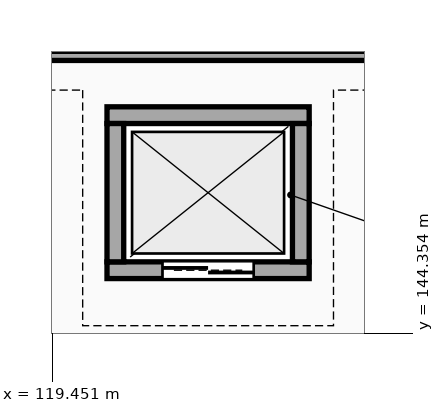
"""IFC4 building model, lengths in metres.
Left out: names, types, materials, properties, quantities, classifications, styles, units other than length and angle.
Written with IfcOpenShell. Run it as: python <this file> out.ifc"""

import sys

from ifc_helpers import new_model, si_unit, direction, frame, frame_2d, origin, place, context, subcontext, project, spatial, rectangle, extrude, element, fill, save


model = new_model("IFC4")
c1 = context("Model", 3, precision=1e-05, world=origin(), true_north=direction((0.0, 1.0)))
c2 = subcontext(c1, "Body", "Model", "MODEL_VIEW")
j1 = project(units=[si_unit("LENGTHUNIT", "METRE"), si_unit("PLANEANGLEUNIT", "RADIAN")], contexts=[c1])
p1 = place(None, origin())
s1 = spatial("IfcSite", under=j1, at=p1, CompositionType="ELEMENT")
p2 = place(p1, origin())
s2 = spatial("IfcBuilding", under=s1, at=p2, CompositionType="ELEMENT")
p3 = place(p2, frame((0.0, 0.0, 5.4)))
s3 = spatial("IfcBuildingStorey", under=s2, at=p3, CompositionType="ELEMENT", Elevation=5.4)
p4 = place(p3, frame((120.17, 145.18, 0.0), z_axis=(0.0, 0.0, 1.0), x_axis=(1.0, 0.0, 0.0)))
e1 = element("IfcWall", 1, at=p4, inside=s3, PredefinedType="STANDARD", context=c2, shape_type="SweptSolid", body=[
    extrude(rectangle(XDim=2.66, YDim=0.22, at=frame_2d((1.33, 0.0))), origin(), (0.0, 0.0, 1.0), 5.12),
])
p5 = place(p4, frame((0.73, 0.0, 0.0)))
e2 = element("IfcOpeningElement", 2, at=p5, cuts=e1, PredefinedType="OPENING", context=c2, shape_type="SweptSolid", body=[
    extrude(rectangle(XDim=1.2, YDim=2.2, at=frame_2d((0.6, 1.1))), frame((0.0, 0.12, 0.0), z_axis=(0.0, -1.0, 0.0), x_axis=(1.0, 0.0, 0.0)), (0.0, 0.0, 1.0), 0.24),
])
p6 = place(p3, frame((122.83, 147.22, 0.0), z_axis=(0.0, 0.0, 1.0), x_axis=(-1.0, 0.0, 0.0)))
e3 = element("IfcWall", 3, at=p6, inside=s3, PredefinedType="STANDARD", context=c2, shape_type="SweptSolid", body=[
    extrude(rectangle(XDim=2.66, YDim=0.22, at=frame_2d((1.33, 0.0))), origin(), (0.0, 0.0, 1.0), 5.12),
])
for number, where, z_axis, x_axis in (
    (4, (120.28, 147.11, 0.0), (0.0, 0.0, 1.0), (0.0, -1.0, 0.0)),
    (5, (122.72, 145.29, 0.0), (0.0, 0.0, 1.0), (0.0, 1.0, 0.0)),
):
    element("IfcWall", number, at=place(p3, frame(where, z_axis=z_axis, x_axis=x_axis)), inside=s3, PredefinedType="STANDARD", context=c2, shape_type="SweptSolid", body=[
        extrude(rectangle(XDim=1.82, YDim=0.22, at=frame_2d((0.91, 0.0))), origin(), (0.0, 0.0, 1.0), 5.12),
    ])
p7 = place(p3, frame((117.0, 148.0, 0.0), z_axis=(0.0, 0.0, 1.0), x_axis=(1.0, 0.0, 0.0)))
e6 = element("IfcWall", 6, at=p7, inside=s3, PredefinedType="PARTITIONING", context=c2, shape_type="SweptSolid", body=[
    extrude(rectangle(XDim=9.0, YDim=0.12, at=frame_2d((4.5, 0.0))), origin(), (0.0, 0.0, 1.0), 4.508),
])
p8 = place(p5, origin())
e7 = element("IfcDoor", 7, at=p8, inside=s3, OperationType="DOUBLE_DOOR_SLIDING", PredefinedType="DOOR", context=c2, shape_type="SweptSolid", body=[
    extrude(rectangle(XDim=1.2, YDim=2.2, at=frame_2d((0.6, 1.1))), frame((0.0, 0.025, 0.0), z_axis=(0.0, -1.0, 0.0), x_axis=(1.0, 0.0, 0.0)), (0.0, 0.0, 1.0), 0.05),
])
fill(e2, e7)
save(model, sys.argv[1])
